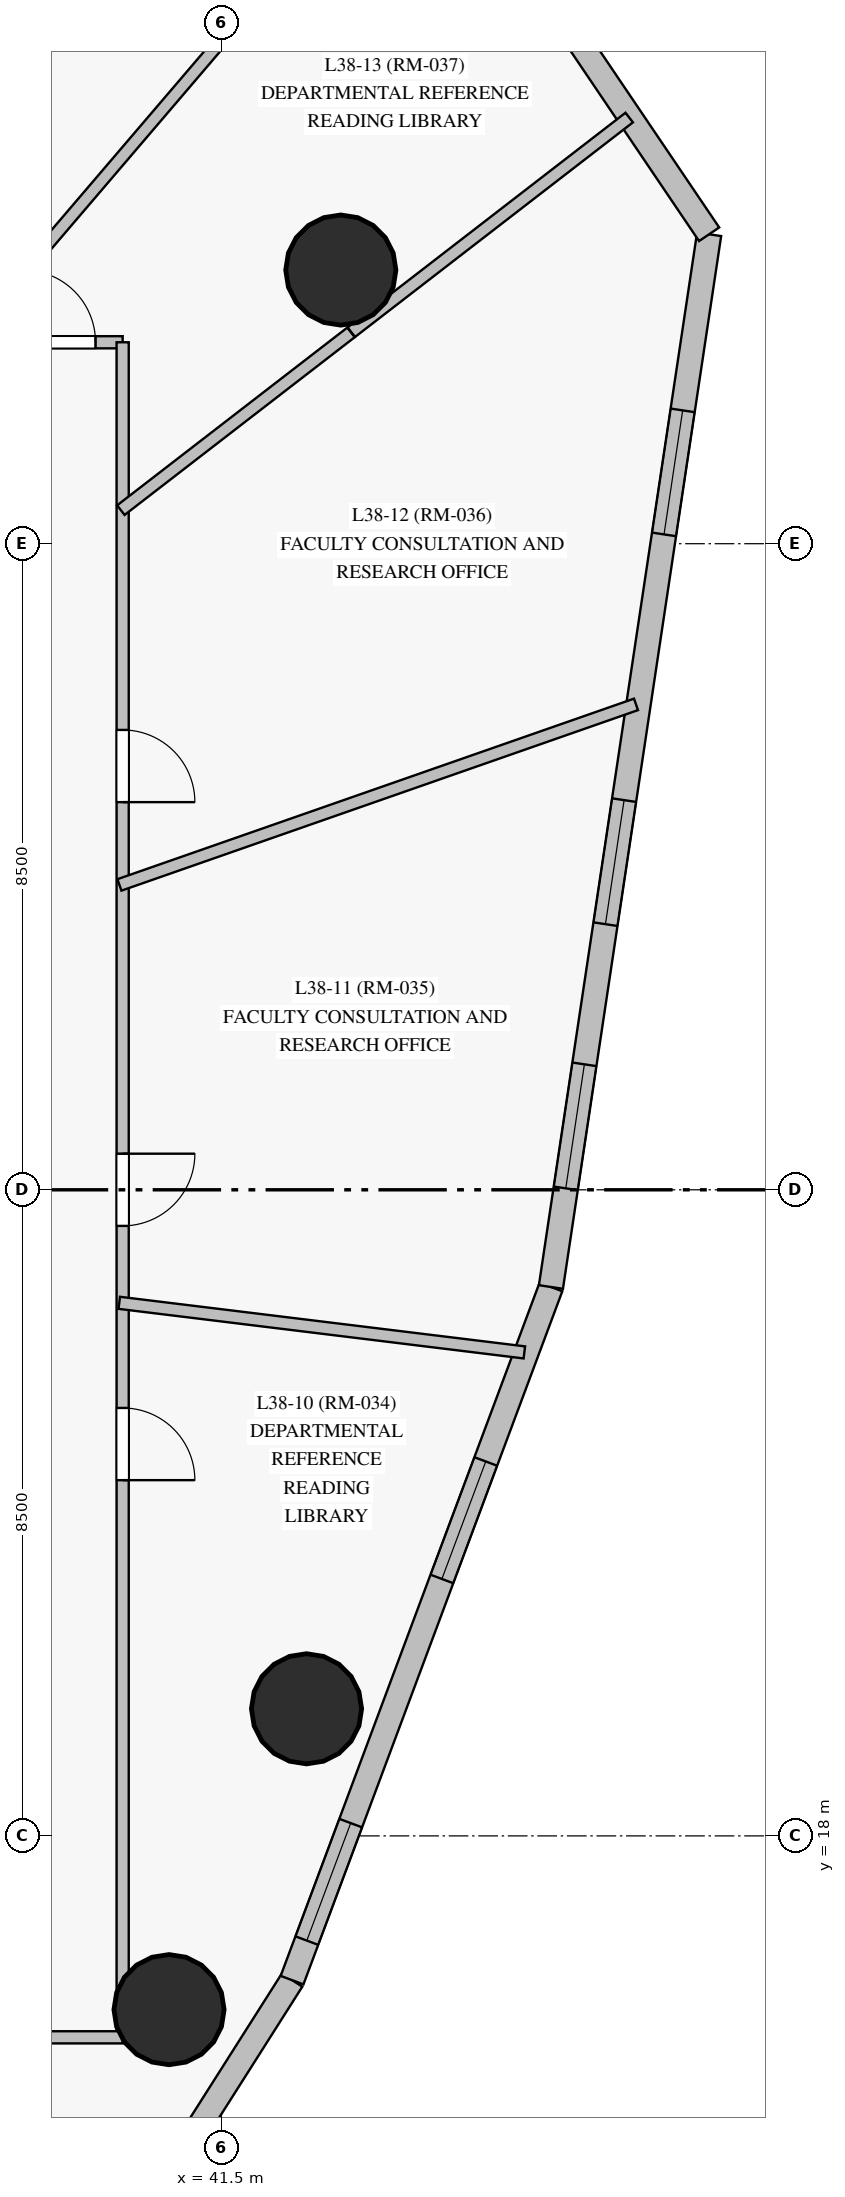
"""IFC4 building model, lengths in metres.
Left out: names, types, materials, properties, quantities, classifications, styles, units other than length and angle.
Written with IfcOpenShell. Run it as: python <this file> out.ifc"""

import sys

from ifc_helpers import new_model, si_unit, direction, frame, frame_2d, origin, origin_with_axes, origin_2d, place, context, subcontext, project, spatial, rectangle, circle, extrude, source, transform, mapped, element, fill, save


model = new_model("IFC4")
c1 = context("Model", 3, precision=1e-05, world=origin(), true_north=direction((0.0, 1.0)))
c2 = subcontext(c1, "Body", "Model", "MODEL_VIEW")
j1 = project(units=[si_unit("LENGTHUNIT", "METRE"), si_unit("PLANEANGLEUNIT", "RADIAN")], contexts=[c1])
p1 = place(None, origin())
s1 = spatial("IfcSite", under=j1, at=p1, CompositionType="ELEMENT")
p2 = place(p1, origin())
s2 = spatial("IfcBuilding", under=s1, at=p2, CompositionType="ELEMENT")
p3 = place(p2, frame((0.0, 0.0, 135.85)))
s3 = spatial("IfcBuildingStorey", under=s2, at=p3, CompositionType="ELEMENT", Elevation=135.85)
m1 = source(origin_with_axes(), c2, "Body", "SweptSolid", [
    extrude(circle(Radius=0.725, at=origin_2d()), origin(), (0.0, 0.0, 1.0), 3.05),
])
for number, where, z_axis, x_axis in (
    (1, (42.619, 19.672, 0.0), (0.0, 0.0, 1.0), (1.0, 0.0, 0.0)),
    (2, (43.07, 38.6, 0.0), (0.0, 0.0, 1.0), (1.0, 0.0, 0.0)),
    (3, (40.81, 15.714, 0.0), (0.0, 0.0, 1.0), (1.0, 0.0, 0.0)),
):
    element("IfcColumn", number, at=place(p3, frame(where, z_axis=z_axis, x_axis=x_axis)), inside=s3, PredefinedType="COLUMN", context=c2, shape_type="MappedRepresentation", body=[
        mapped(m1, transform((0.0, 0.0, 0.0), scale=1.0)),
    ])
p4 = place(p3, frame((34.921, 4.279, 0.0), z_axis=(0.0, 0.0, 1.0), x_axis=(0.536041661003, 0.84419152902, 0.0)))
e4 = element("IfcWall", 4, at=p4, inside=s3, PredefinedType="SOLIDWALL", context=c2, shape_type="SweptSolid", body=[
    extrude(rectangle(XDim=14.005, YDim=0.32, at=frame_2d((7.002, 0.0))), origin(), (0.0, 0.0, 1.0), 2.825),
])
p5 = place(p4, frame((1.791, 0.0, 0.85)))
e5 = element("IfcOpeningElement", 5, at=p5, cuts=e4, PredefinedType="OPENING", context=c2, shape_type="SweptSolid", body=[
    extrude(rectangle(XDim=1.65, YDim=1.65, at=frame_2d((0.825, 0.825))), frame((0.0, 0.17, 0.0), z_axis=(0.0, -1.0, 0.0), x_axis=(1.0, 0.0, 0.0)), (0.0, 0.0, 1.0), 0.34),
])
p6 = place(p4, frame((7.811, 0.0, 0.85)))
e6 = element("IfcOpeningElement", 6, at=p6, cuts=e4, PredefinedType="OPENING", context=c2, shape_type="SweptSolid", body=[
    extrude(rectangle(XDim=1.65, YDim=1.65, at=frame_2d((0.825, 0.825))), frame((0.0, 0.17, 0.0), z_axis=(0.0, -1.0, 0.0), x_axis=(1.0, 0.0, 0.0)), (0.0, 0.0, 1.0), 0.34),
])
p7 = place(p3, frame((42.429, 16.102, 0.0), z_axis=(0.0, 0.0, 1.0), x_axis=(0.349878020964, 0.936795266025, 0.0)))
e7 = element("IfcWall", 7, at=p7, inside=s3, PredefinedType="SOLIDWALL", context=c2, shape_type="SweptSolid", body=[
    extrude(rectangle(XDim=9.734, YDim=0.32, at=frame_2d((4.867, 0.0))), origin(), (0.0, 0.0, 1.0), 2.825),
])
p8 = place(p7, frame((0.555, 0.0, 0.85)))
e8 = element("IfcOpeningElement", 8, at=p8, cuts=e7, PredefinedType="OPENING", context=c2, shape_type="SweptSolid", body=[
    extrude(rectangle(XDim=1.65, YDim=1.65, at=frame_2d((0.825, 0.825))), frame((0.0, 0.17, 0.0), z_axis=(0.0, -1.0, 0.0), x_axis=(1.0, 0.0, 0.0)), (0.0, 0.0, 1.0), 0.34),
])
p9 = place(p7, frame((5.634, 0.0, 0.85)))
e9 = element("IfcOpeningElement", 9, at=p9, cuts=e7, PredefinedType="OPENING", context=c2, shape_type="SweptSolid", body=[
    extrude(rectangle(XDim=1.65, YDim=1.65, at=frame_2d((0.825, 0.825))), frame((0.0, 0.17, 0.0), z_axis=(0.0, -1.0, 0.0), x_axis=(1.0, 0.0, 0.0)), (0.0, 0.0, 1.0), 0.34),
])
p10 = place(p3, frame((45.834, 25.221, 0.0), z_axis=(0.0, 0.0, 1.0), x_axis=(0.148592768658, 0.988898472596, 0.0)))
e10 = element("IfcWall", 10, at=p10, inside=s3, PredefinedType="SOLIDWALL", context=c2, shape_type="SweptSolid", body=[
    extrude(rectangle(XDim=14.005, YDim=0.32, at=frame_2d((7.002, 0.0))), origin(), (0.0, 0.0, 1.0), 2.825),
])
p11 = place(p10, frame((1.312, 0.0, 0.85)))
e11 = element("IfcOpeningElement", 11, at=p11, cuts=e10, PredefinedType="OPENING", context=c2, shape_type="SweptSolid", body=[
    extrude(rectangle(XDim=1.65, YDim=1.65, at=frame_2d((0.825, 0.825))), frame((0.0, 0.17, 0.0), z_axis=(0.0, -1.0, 0.0), x_axis=(1.0, 0.0, 0.0)), (0.0, 0.0, 1.0), 0.34),
])
p12 = place(p10, frame((4.827, 0.0, 0.85)))
e12 = element("IfcOpeningElement", 12, at=p12, cuts=e10, PredefinedType="OPENING", context=c2, shape_type="SweptSolid", body=[
    extrude(rectangle(XDim=1.65, YDim=1.65, at=frame_2d((0.825, 0.825))), frame((0.0, 0.17, 0.0), z_axis=(0.0, -1.0, 0.0), x_axis=(1.0, 0.0, 0.0)), (0.0, 0.0, 1.0), 0.34),
])
p13 = place(p10, frame((10.012, 0.0, 0.85)))
e13 = element("IfcOpeningElement", 13, at=p13, cuts=e10, PredefinedType="OPENING", context=c2, shape_type="SweptSolid", body=[
    extrude(rectangle(XDim=1.65, YDim=1.65, at=frame_2d((0.825, 0.825))), frame((0.0, 0.17, 0.0), z_axis=(0.0, -1.0, 0.0), x_axis=(1.0, 0.0, 0.0)), (0.0, 0.0, 1.0), 0.34),
])
p14 = place(p3, frame((47.916, 39.071, 0.0), z_axis=(0.0, 0.0, 1.0), x_axis=(-0.559977947863, 0.828507512282, 0.0)))
e14 = element("IfcWall", 14, at=p14, inside=s3, PredefinedType="SOLIDWALL", context=c2, shape_type="SweptSolid", body=[
    extrude(rectangle(XDim=9.396, YDim=0.32, at=frame_2d((4.698, 0.0))), origin(), (0.0, 0.0, 1.0), 2.825),
])
p15 = place(p14, frame((3.484, 0.0, 0.85)))
e15 = element("IfcOpeningElement", 15, at=p15, cuts=e14, PredefinedType="OPENING", context=c2, shape_type="SweptSolid", body=[
    extrude(rectangle(XDim=1.65, YDim=1.65, at=frame_2d((0.825, 0.825))), frame((0.0, 0.17, 0.0), z_axis=(0.0, -1.0, 0.0), x_axis=(1.0, 0.0, 0.0)), (0.0, 0.0, 1.0), 0.34),
])
p16 = place(p14, frame((7.223, 0.0, 0.85)))
e16 = element("IfcOpeningElement", 16, at=p16, cuts=e14, PredefinedType="OPENING", context=c2, shape_type="SweptSolid", body=[
    extrude(rectangle(XDim=1.65, YDim=1.65, at=frame_2d((0.825, 0.825))), frame((0.0, 0.17, 0.0), z_axis=(0.0, -1.0, 0.0), x_axis=(1.0, 0.0, 0.0)), (0.0, 0.0, 1.0), 0.34),
])
p17 = place(p3, frame((16.7, 37.65, 0.0), z_axis=(0.0, 0.0, 1.0), x_axis=(1.0, 0.0, 0.0)))
e17 = element("IfcWall", 17, at=p17, inside=s3, PredefinedType="PARTITIONING", context=c2, shape_type="SweptSolid", body=[
    extrude(rectangle(XDim=23.5, YDim=0.16, at=frame_2d((11.75, 0.0))), origin(), (0.0, 0.0, 1.0), 2.325),
])
p18 = place(p17, frame((22.193, 0.0, 0.0)))
e18 = element("IfcOpeningElement", 18, at=p18, cuts=e17, PredefinedType="OPENING", context=c2, shape_type="SweptSolid", body=[
    extrude(rectangle(XDim=0.95, YDim=2.15, at=frame_2d((0.475, 1.075))), frame((0.0, 0.09, 0.0), z_axis=(0.0, -1.0, 0.0), x_axis=(1.0, 0.0, 0.0)), (0.0, 0.0, 1.0), 0.18),
])
p19 = place(p17, frame((19.739, 0.0, 0.0)))
e19 = element("IfcOpeningElement", 19, at=p19, cuts=e17, PredefinedType="OPENING", context=c2, shape_type="SweptSolid", body=[
    extrude(rectangle(XDim=0.95, YDim=2.15, at=frame_2d((0.475, 1.075))), frame((0.0, 0.09, 0.0), z_axis=(0.0, -1.0, 0.0), x_axis=(1.0, 0.0, 0.0)), (0.0, 0.0, 1.0), 0.18),
])
p20 = place(p17, frame((17.15, 0.0, 0.0)))
e20 = element("IfcOpeningElement", 20, at=p20, cuts=e17, PredefinedType="OPENING", context=c2, shape_type="SweptSolid", body=[
    extrude(rectangle(XDim=0.95, YDim=2.15, at=frame_2d((0.475, 1.075))), frame((0.0, 0.09, 0.0), z_axis=(0.0, -1.0, 0.0), x_axis=(1.0, 0.0, 0.0)), (0.0, 0.0, 1.0), 0.18),
])
p21 = place(p17, frame((15.29, 0.0, 0.0)))
e21 = element("IfcOpeningElement", 21, at=p21, cuts=e17, PredefinedType="OPENING", context=c2, shape_type="SweptSolid", body=[
    extrude(rectangle(XDim=0.95, YDim=2.15, at=frame_2d((0.475, 1.075))), frame((0.0, 0.09, 0.0), z_axis=(0.0, -1.0, 0.0), x_axis=(1.0, 0.0, 0.0)), (0.0, 0.0, 1.0), 0.18),
])
p22 = place(p17, frame((13.507, 0.0, 0.0)))
e22 = element("IfcOpeningElement", 22, at=p22, cuts=e17, PredefinedType="OPENING", context=c2, shape_type="SweptSolid", body=[
    extrude(rectangle(XDim=0.95, YDim=2.15, at=frame_2d((0.475, 1.075))), frame((0.0, 0.09, 0.0), z_axis=(0.0, -1.0, 0.0), x_axis=(1.0, 0.0, 0.0)), (0.0, 0.0, 1.0), 0.18),
])
p23 = place(p17, frame((11.415, 0.0, 0.0)))
e23 = element("IfcOpeningElement", 23, at=p23, cuts=e17, PredefinedType="OPENING", context=c2, shape_type="SweptSolid", body=[
    extrude(rectangle(XDim=0.95, YDim=2.15, at=frame_2d((0.475, 1.075))), frame((0.0, 0.09, 0.0), z_axis=(0.0, -1.0, 0.0), x_axis=(1.0, 0.0, 0.0)), (0.0, 0.0, 1.0), 0.18),
])
p24 = place(p17, frame((9.772, 0.0, 0.0)))
e24 = element("IfcOpeningElement", 24, at=p24, cuts=e17, PredefinedType="OPENING", context=c2, shape_type="SweptSolid", body=[
    extrude(rectangle(XDim=0.95, YDim=2.15, at=frame_2d((0.475, 1.075))), frame((0.0, 0.09, 0.0), z_axis=(0.0, -1.0, 0.0), x_axis=(1.0, 0.0, 0.0)), (0.0, 0.0, 1.0), 0.18),
])
p25 = place(p17, frame((7.75, 0.0, 0.0)))
e25 = element("IfcOpeningElement", 25, at=p25, cuts=e17, PredefinedType="OPENING", context=c2, shape_type="SweptSolid", body=[
    extrude(rectangle(XDim=0.95, YDim=2.15, at=frame_2d((0.475, 1.075))), frame((0.0, 0.09, 0.0), z_axis=(0.0, -1.0, 0.0), x_axis=(1.0, 0.0, 0.0)), (0.0, 0.0, 1.0), 0.18),
])
p26 = place(p17, frame((3.021, 0.0, 0.0)))
e26 = element("IfcOpeningElement", 26, at=p26, cuts=e17, PredefinedType="OPENING", context=c2, shape_type="SweptSolid", body=[
    extrude(rectangle(XDim=0.95, YDim=2.15, at=frame_2d((0.475, 1.075))), frame((0.0, 0.09, 0.0), z_axis=(0.0, -1.0, 0.0), x_axis=(1.0, 0.0, 0.0)), (0.0, 0.0, 1.0), 0.18),
])
p27 = place(p3, frame((40.2, 37.65, 0.0), z_axis=(0.0, 0.0, 1.0), x_axis=(0.0, -1.0, 0.0)))
e27 = element("IfcWall", 27, at=p27, inside=s3, PredefinedType="PARTITIONING", context=c2, shape_type="SweptSolid", body=[
    extrude(rectangle(XDim=22.3, YDim=0.16, at=frame_2d((11.15, 0.0))), origin(), (0.0, 0.0, 1.0), 2.325),
])
p28 = place(p27, frame((14.02, 0.0, 0.0)))
e28 = element("IfcOpeningElement", 28, at=p28, cuts=e27, PredefinedType="OPENING", context=c2, shape_type="SweptSolid", body=[
    extrude(rectangle(XDim=0.95, YDim=2.15, at=frame_2d((0.475, 1.075))), frame((0.0, 0.09, 0.0), z_axis=(0.0, -1.0, 0.0), x_axis=(1.0, 0.0, 0.0)), (0.0, 0.0, 1.0), 0.18),
])
p29 = place(p27, frame((10.675, 0.0, 0.0)))
e29 = element("IfcOpeningElement", 29, at=p29, cuts=e27, PredefinedType="OPENING", context=c2, shape_type="SweptSolid", body=[
    extrude(rectangle(XDim=0.95, YDim=2.15, at=frame_2d((0.475, 1.075))), frame((0.0, 0.09, 0.0), z_axis=(0.0, -1.0, 0.0), x_axis=(1.0, 0.0, 0.0)), (0.0, 0.0, 1.0), 0.18),
])
p30 = place(p27, frame((5.1, 0.0, 0.0)))
e30 = element("IfcOpeningElement", 30, at=p30, cuts=e27, PredefinedType="OPENING", context=c2, shape_type="SweptSolid", body=[
    extrude(rectangle(XDim=0.95, YDim=2.15, at=frame_2d((0.475, 1.075))), frame((0.0, 0.09, 0.0), z_axis=(0.0, -1.0, 0.0), x_axis=(1.0, 0.0, 0.0)), (0.0, 0.0, 1.0), 0.18),
])
p31 = place(p3, frame((35.742, 37.625, 0.0), z_axis=(0.0, 0.0, 1.0), x_axis=(0.541798178904, 0.840508615861, 0.0)))
e31 = element("IfcWall", 31, at=p31, inside=s3, PredefinedType="PARTITIONING", context=c2, shape_type="SweptSolid", body=[
    extrude(rectangle(XDim=11.201, YDim=0.16, at=frame_2d((5.601, 0.0))), origin(), (0.0, 0.0, 1.0), 2.825),
])
p32 = place(p3, frame((40.2, 15.35, 0.0), z_axis=(0.0, 0.0, 1.0), x_axis=(-1.0, 0.0, 0.0)))
e32 = element("IfcWall", 32, at=p32, inside=s3, PredefinedType="PARTITIONING", context=c2, shape_type="SweptSolid", body=[
    extrude(rectangle(XDim=10.65, YDim=0.16, at=frame_2d((5.325, 0.0))), origin(), (0.0, 0.0, 1.0), 2.225),
])
p33 = place(p32, frame((6.448, 0.0, 0.0)))
e33 = element("IfcOpeningElement", 33, at=p33, cuts=e32, PredefinedType="OPENING", context=c2, shape_type="SweptSolid", body=[
    extrude(rectangle(XDim=0.95, YDim=2.15, at=frame_2d((0.475, 1.075))), frame((0.0, 0.09, 0.0), z_axis=(0.0, -1.0, 0.0), x_axis=(1.0, 0.0, 0.0)), (0.0, 0.0, 1.0), 0.18),
])
p34 = place(p32, frame((4.56, 0.0, 0.0)))
e34 = element("IfcOpeningElement", 34, at=p34, cuts=e32, PredefinedType="OPENING", context=c2, shape_type="SweptSolid", body=[
    extrude(rectangle(XDim=0.95, YDim=2.15, at=frame_2d((0.475, 1.075))), frame((0.0, 0.09, 0.0), z_axis=(0.0, -1.0, 0.0), x_axis=(1.0, 0.0, 0.0)), (0.0, 0.0, 1.0), 0.18),
])
p35 = place(p3, frame((38.088, 37.627, 0.0), z_axis=(0.0, 0.0, 1.0), x_axis=(0.649663413135, 0.760221973922, 0.0)))
e35 = element("IfcWall", 35, at=p35, inside=s3, PredefinedType="PARTITIONING", context=c2, shape_type="SweptSolid", body=[
    extrude(rectangle(XDim=9.257, YDim=0.16, at=frame_2d((4.628, 0.0))), origin(), (0.0, 0.0, 1.0), 2.825),
])
p36 = place(p3, frame((40.157, 30.511, 0.0), z_axis=(0.0, 0.0, 1.0), x_axis=(0.94400207615, 0.329939509946, 0.0)))
e36 = element("IfcWall", 36, at=p36, inside=s3, PredefinedType="PARTITIONING", context=c2, shape_type="SweptSolid", body=[
    extrude(rectangle(XDim=7.199, YDim=0.16, at=frame_2d((3.6, 0.0))), origin(), (0.0, 0.0, 1.0), 2.825),
])
p37 = place(p3, frame((40.155, 25.013, 0.0), z_axis=(0.0, 0.0, 1.0), x_axis=(0.992591537603, -0.121499133651, 0.0)))
e37 = element("IfcWall", 37, at=p37, inside=s3, PredefinedType="PARTITIONING", context=c2, shape_type="SweptSolid", body=[
    extrude(rectangle(XDim=5.369, YDim=0.16, at=frame_2d((2.685, 0.0))), origin(), (0.0, 0.0, 1.0), 2.825),
])
p38 = place(p3, frame((40.176, 35.441, 0.0), z_axis=(0.0, 0.0, 1.0), x_axis=(0.791467391046, 0.611211394617, 0.0)))
e38 = element("IfcWall", 38, at=p38, inside=s3, PredefinedType="PARTITIONING", context=c2, shape_type="SweptSolid", body=[
    extrude(rectangle(XDim=3.826, YDim=0.16, at=frame_2d((1.913, 0.0))), origin(), (0.0, 0.0, 1.0), 2.825),
])
p39 = place(p3, frame((43.208, 37.783, 0.0), z_axis=(0.0, 0.0, 1.0), x_axis=(0.791484900465, 0.611188720721, 0.0)))
e39 = element("IfcWall", 39, at=p39, inside=s3, PredefinedType="PARTITIONING", context=c2, shape_type="SweptSolid", body=[
    extrude(rectangle(XDim=4.619, YDim=0.16, at=frame_2d((2.31, 0.0))), origin(), (0.0, 0.0, 1.0), 2.825),
])
m2 = source(origin_with_axes(), c2, "Body", "SweptSolid", [
    extrude(rectangle(XDim=1.65, YDim=1.65, at=frame_2d((0.825, 0.825))), frame((0.0, 0.03, 0.0), z_axis=(0.0, -1.0, 0.0), x_axis=(1.0, 0.0, 0.0)), (0.0, 0.0, 1.0), 0.06),
])
p40 = place(p8, origin())
e40 = element("IfcWindow", 40, at=p40, inside=s3, PartitioningType="SINGLE_PANEL", PredefinedType="WINDOW", context=c2, shape_type="MappedRepresentation", body=[
    mapped(m2, transform((0.0, 0.0, 0.0), scale=1.0)),
])
fill(e8, e40)
p41 = place(p9, origin())
e41 = element("IfcWindow", 41, at=p41, inside=s3, PartitioningType="SINGLE_PANEL", PredefinedType="WINDOW", context=c2, shape_type="MappedRepresentation", body=[
    mapped(m2, transform((0.0, 0.0, 0.0), scale=1.0)),
])
fill(e9, e41)
p42 = place(p11, origin())
e42 = element("IfcWindow", 42, at=p42, inside=s3, PartitioningType="SINGLE_PANEL", PredefinedType="WINDOW", context=c2, shape_type="MappedRepresentation", body=[
    mapped(m2, transform((0.0, 0.0, 0.0), scale=1.0)),
])
fill(e11, e42)
p43 = place(p12, origin())
e43 = element("IfcWindow", 43, at=p43, inside=s3, PartitioningType="SINGLE_PANEL", PredefinedType="WINDOW", context=c2, shape_type="MappedRepresentation", body=[
    mapped(m2, transform((0.0, 0.0, 0.0), scale=1.0)),
])
fill(e12, e43)
p44 = place(p13, origin())
e44 = element("IfcWindow", 44, at=p44, inside=s3, PartitioningType="SINGLE_PANEL", PredefinedType="WINDOW", context=c2, shape_type="MappedRepresentation", body=[
    mapped(m2, transform((0.0, 0.0, 0.0), scale=1.0)),
])
fill(e13, e44)
m3 = source(origin_with_axes(), c2, "Body", "SweptSolid", [
    extrude(rectangle(XDim=0.95, YDim=2.15, at=frame_2d((0.475, 1.075))), frame((0.0, 0.025, 0.0), z_axis=(0.0, -1.0, 0.0), x_axis=(1.0, 0.0, 0.0)), (0.0, 0.0, 1.0), 0.05),
])
p45 = place(p28, origin())
e45 = element("IfcDoor", 45, at=p45, inside=s3, OperationType="SINGLE_SWING_RIGHT", PredefinedType="DOOR", context=c2, shape_type="MappedRepresentation", body=[
    mapped(m3, transform((0.0, 0.0, 0.0), scale=1.0)),
])
fill(e28, e45)
p46 = place(p29, origin())
e46 = element("IfcDoor", 46, at=p46, inside=s3, OperationType="SINGLE_SWING_LEFT", PredefinedType="DOOR", context=c2, shape_type="MappedRepresentation", body=[
    mapped(m3, transform((0.0, 0.0, 0.0), scale=1.0)),
])
fill(e29, e46)
p47 = place(p30, origin())
e47 = element("IfcDoor", 47, at=p47, inside=s3, OperationType="SINGLE_SWING_RIGHT", PredefinedType="DOOR", context=c2, shape_type="MappedRepresentation", body=[
    mapped(m3, transform((0.0, 0.0, 0.0), scale=1.0)),
])
fill(e30, e47)
p48 = place(p18, origin())
e48 = element("IfcDoor", 48, at=p48, inside=s3, OperationType="SINGLE_SWING_LEFT", PredefinedType="DOOR", context=c2, shape_type="MappedRepresentation", body=[
    mapped(m3, transform((0.0, 0.0, 0.0), scale=1.0)),
])
fill(e18, e48)
save(model, sys.argv[1])
